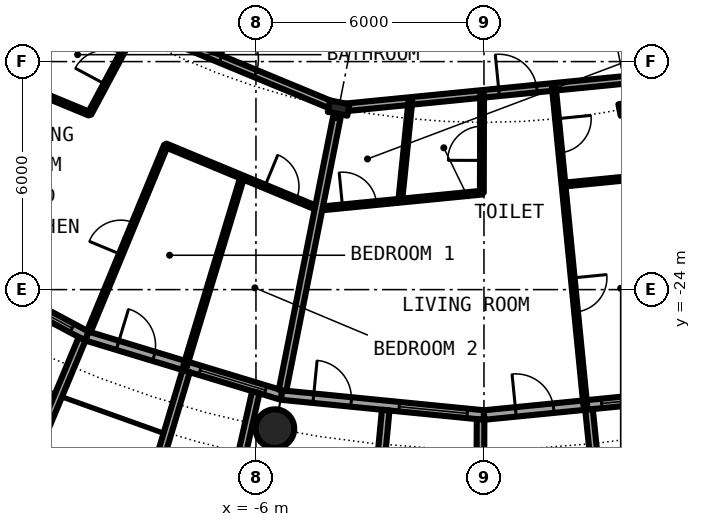
"""IFC4 building model, lengths in metres.
Left out: names, types, materials, properties, quantities, classifications, styles, units other than length and angle.
Written with IfcOpenShell. Run it as: python <this file> out.ifc"""

import sys

from ifc_helpers import new_model, si_unit, direction, frame, frame_2d, origin, origin_2d, place, context, subcontext, project, spatial, rectangle, hollow_circle, i_section, extrude, element, fill, save


model = new_model("IFC4")
c1 = context("Model", 3, precision=1e-05, world=origin(), true_north=direction((0.0, 1.0)))
c2 = subcontext(c1, "Body", "Model", "MODEL_VIEW")
j1 = project(units=[si_unit("LENGTHUNIT", "METRE"), si_unit("PLANEANGLEUNIT", "RADIAN")], contexts=[c1])
p1 = place(None, origin())
s1 = spatial("IfcSite", under=j1, at=p1, CompositionType="ELEMENT")
p2 = place(p1, origin())
s2 = spatial("IfcBuilding", under=s1, at=p2, CompositionType="ELEMENT")
p3 = place(p2, frame((0.0, 0.0, 63.6)))
s3 = spatial("IfcBuildingStorey", under=s2, at=p3, CompositionType="ELEMENT", Elevation=63.6)
p4 = place(p3, frame((-5.501, -27.658, 0.0), z_axis=(0.0, 0.0, 1.0), x_axis=(1.0, 0.0, 0.0)))
e1 = element("IfcColumn", 1, at=p4, inside=s3, PredefinedType="COLUMN", context=c2, shape_type="SweptSolid", body=[
    extrude(hollow_circle(Radius=0.508, WallThickness=0.04, at=origin_2d()), origin(), (0.0, 0.0, 1.0), 3.05),
])
for number, where, z_axis, x_axis in (
    (2, (-3.824, -19.223, 0.0), (0.0, 0.0, 1.0), (-0.195, -0.981, 0.0)),
    (3, (3.824, -19.223, 0.0), (0.0, 0.0, 1.0), (0.195, -0.981, 0.0)),
):
    element("IfcColumn", number, at=place(p3, frame(where, z_axis=z_axis, x_axis=x_axis)), inside=s3, PredefinedType="COLUMN", context=c2, shape_type="SweptSolid", body=[
        extrude(i_section(OverallWidth=0.306, OverallDepth=0.524, WebThickness=0.021, FlangeThickness=0.04, FilletRadius=0.027, at=origin_2d()), origin(), (0.0, 0.0, 1.0), 3.05),
    ])
p5 = place(p3, frame((-15.167, -22.699, 0.0), z_axis=(0.0, 0.0, 1.0), x_axis=(0.881915646801, -0.471407246368, 0.0)))
e4 = element("IfcWall", 4, at=p5, inside=s3, PredefinedType="SOLIDWALL", context=c2, shape_type="SweptSolid", body=[
    extrude(rectangle(XDim=5.352, YDim=0.25, at=frame_2d((2.676, 0.0))), origin(), (0.0, 0.0, 1.0), 2.7),
])
p6 = place(p5, frame((0.841, 0.0, 0.0)))
e5 = element("IfcOpeningElement", 5, at=p6, cuts=e4, PredefinedType="OPENING", context=c2, shape_type="SweptSolid", body=[
    extrude(rectangle(XDim=1.0, YDim=2.2, at=frame_2d((0.5, 1.1))), frame((0.0, 0.135, 0.0), z_axis=(0.0, -1.0, 0.0), x_axis=(1.0, 0.0, 0.0)), (0.0, 0.0, 1.0), 0.27),
])
p7 = place(p5, frame((3.111, 0.0, 0.3)))
e6 = element("IfcOpeningElement", 6, at=p7, cuts=e4, PredefinedType="OPENING", context=c2, shape_type="SweptSolid", body=[
    extrude(rectangle(XDim=1.8, YDim=2.1, at=frame_2d((0.9, 1.05))), frame((0.0, 0.135, 0.0), z_axis=(0.0, -1.0, 0.0), x_axis=(1.0, 0.0, 0.0)), (0.0, 0.0, 1.0), 0.27),
])
p8 = place(p3, frame((-10.575, -25.295, -0.03), z_axis=(0.0, 0.0, 1.0), x_axis=(-0.385697364644, -0.922625353492, 0.0)))
e7 = element("IfcWall", 7, at=p8, inside=s3, PredefinedType="SOLIDWALL", context=c2, shape_type="SweptSolid", body=[
    extrude(rectangle(XDim=2.883, YDim=0.2, at=frame_2d((1.442, 0.0))), origin(), (0.0, 0.0, 1.0), 2.73),
])
p9 = place(p3, frame((-10.447, -25.222, 0.0), z_axis=(0.0, 0.0, 1.0), x_axis=(0.956965678721, -0.290201119486, 0.0)))
e8 = element("IfcWall", 8, at=p9, inside=s3, PredefinedType="SOLIDWALL", context=c2, shape_type="SweptSolid", body=[
    extrude(rectangle(XDim=5.351, YDim=0.25, at=frame_2d((2.676, 0.0))), origin(), (0.0, 0.0, 1.0), 2.7),
])
p10 = place(p9, frame((0.841, 0.0, 0.0)))
e9 = element("IfcOpeningElement", 9, at=p10, cuts=e8, PredefinedType="OPENING", context=c2, shape_type="SweptSolid", body=[
    extrude(rectangle(XDim=1.0, YDim=2.2, at=frame_2d((0.5, 1.1))), frame((0.0, 0.135, 0.0), z_axis=(0.0, -1.0, 0.0), x_axis=(1.0, 0.0, 0.0)), (0.0, 0.0, 1.0), 0.27),
])
p11 = place(p9, frame((3.111, 0.0, 0.3)))
e10 = element("IfcOpeningElement", 10, at=p11, cuts=e8, PredefinedType="OPENING", context=c2, shape_type="SweptSolid", body=[
    extrude(rectangle(XDim=1.8, YDim=2.1, at=frame_2d((0.9, 1.05))), frame((0.0, 0.135, 0.0), z_axis=(0.0, -1.0, 0.0), x_axis=(1.0, 0.0, 0.0)), (0.0, 0.0, 1.0), 0.27),
])
p12 = place(p3, frame((-7.837, -26.144, -0.03), z_axis=(0.0, 0.0, 1.0), x_axis=(-0.287064767992, -0.957911174889, 0.0)))
e11 = element("IfcWall", 11, at=p12, inside=s3, PredefinedType="SOLIDWALL", context=c2, shape_type="SweptSolid", body=[
    extrude(rectangle(XDim=3.006, YDim=0.2, at=frame_2d((1.503, 0.0))), origin(), (0.0, 0.0, 1.0), 2.73),
])
p13 = place(p3, frame((-6.004, -26.7, -0.03), z_axis=(0.0, 0.0, 1.0), x_axis=(-0.219609259383, -0.975587911566, 0.0)))
e12 = element("IfcWall", 12, at=p13, inside=s3, PredefinedType="SOLIDWALL", context=c2, shape_type="SweptSolid", body=[
    extrude(rectangle(XDim=2.933, YDim=0.2, at=frame_2d((1.466, 0.0))), origin(), (0.0, 0.0, 1.0), 2.73),
])
p14 = place(p3, frame((-5.326, -26.775, 0.0), z_axis=(0.0, 0.0, 1.0), x_axis=(0.995173996315, -0.098126026407, 0.0)))
e13 = element("IfcWall", 13, at=p14, inside=s3, PredefinedType="SOLIDWALL", context=c2, shape_type="SweptSolid", body=[
    extrude(rectangle(XDim=5.352, YDim=0.25, at=frame_2d((2.676, 0.0))), origin(), (0.0, 0.0, 1.0), 2.7),
])
p15 = place(p14, frame((0.841, 0.0, 0.0)))
e14 = element("IfcOpeningElement", 14, at=p15, cuts=e13, PredefinedType="OPENING", context=c2, shape_type="SweptSolid", body=[
    extrude(rectangle(XDim=1.0, YDim=2.2, at=frame_2d((0.5, 1.1))), frame((0.0, 0.135, 0.0), z_axis=(0.0, -1.0, 0.0), x_axis=(1.0, 0.0, 0.0)), (0.0, 0.0, 1.0), 0.27),
])
p16 = place(p14, frame((3.111, 0.0, 0.3)))
e15 = element("IfcOpeningElement", 15, at=p16, cuts=e13, PredefinedType="OPENING", context=c2, shape_type="SweptSolid", body=[
    extrude(rectangle(XDim=1.8, YDim=2.1, at=frame_2d((0.9, 1.05))), frame((0.0, 0.135, 0.0), z_axis=(0.0, -1.0, 0.0), x_axis=(1.0, 0.0, 0.0)), (0.0, 0.0, 1.0), 0.27),
])
p17 = place(p3, frame((-2.586, -27.171, -0.03), z_axis=(0.0, 0.0, 1.0), x_axis=(-0.094548432284, -0.995520262954, 0.0)))
e16 = element("IfcWall", 16, at=p17, inside=s3, PredefinedType="SOLIDWALL", context=c2, shape_type="SweptSolid", body=[
    extrude(rectangle(XDim=3.006, YDim=0.2, at=frame_2d((1.503, 0.0))), origin(), (0.0, 0.0, 1.0), 2.73),
])
p18 = place(p3, frame((-0.09, -27.417, -0.03), z_axis=(0.0, 0.0, 1.0), x_axis=(-0.00347308367, -0.999993968827, 0.0)))
e17 = element("IfcWall", 17, at=p18, inside=s3, PredefinedType="SOLIDWALL", context=c2, shape_type="SweptSolid", body=[
    extrude(rectangle(XDim=2.882, YDim=0.2, at=frame_2d((1.441, 0.0))), origin(), (0.0, 0.0, 1.0), 2.73),
])
p19 = place(p3, frame((0.0, -27.3, 0.0), z_axis=(0.0, 0.0, 1.0), x_axis=(0.995173996315, 0.098126026407, 0.0)))
e18 = element("IfcWall", 18, at=p19, inside=s3, PredefinedType="SOLIDWALL", context=c2, shape_type="SweptSolid", body=[
    extrude(rectangle(XDim=5.352, YDim=0.25, at=frame_2d((2.676, 0.0))), origin(), (0.0, 0.0, 1.0), 2.7),
])
p20 = place(p19, frame((0.841, 0.0, 0.0)))
e19 = element("IfcOpeningElement", 19, at=p20, cuts=e18, PredefinedType="OPENING", context=c2, shape_type="SweptSolid", body=[
    extrude(rectangle(XDim=1.0, YDim=2.2, at=frame_2d((0.5, 1.1))), frame((0.0, 0.135, 0.0), z_axis=(0.0, -1.0, 0.0), x_axis=(1.0, 0.0, 0.0)), (0.0, 0.0, 1.0), 0.27),
])
p21 = place(p19, frame((3.111, 0.0, 0.3)))
e20 = element("IfcOpeningElement", 20, at=p21, cuts=e18, PredefinedType="OPENING", context=c2, shape_type="SweptSolid", body=[
    extrude(rectangle(XDim=1.8, YDim=2.1, at=frame_2d((0.9, 1.05))), frame((0.0, 0.135, 0.0), z_axis=(0.0, -1.0, 0.0), x_axis=(1.0, 0.0, 0.0)), (0.0, 0.0, 1.0), 0.27),
])
p22 = place(p3, frame((2.764, -27.153, -0.03), z_axis=(0.0, 0.0, 1.0), x_axis=(0.101505487237, -0.994834979311, 0.0)))
e21 = element("IfcWall", 21, at=p22, inside=s3, PredefinedType="SOLIDWALL", context=c2, shape_type="SweptSolid", body=[
    extrude(rectangle(XDim=3.007, YDim=0.2, at=frame_2d((1.503, 0.0))), origin(), (0.0, 0.0, 1.0), 2.73),
])
p23 = place(p3, frame((-12.392, -18.541, 0.0), z_axis=(0.0, 0.0, 1.0), x_axis=(0.923901895183, -0.382629439638, 0.0)))
e22 = element("IfcWall", 22, at=p23, inside=s3, PredefinedType="PARTITIONING", context=c2, shape_type="SweptSolid", body=[
    extrude(rectangle(XDim=2.175, YDim=0.1, at=frame_2d((1.087, 0.0))), origin(), (0.0, 0.0, 1.0), 2.7),
])
p24 = place(p3, frame((-8.376, -20.204, 0.0), z_axis=(0.0, 0.0, 1.0), x_axis=(0.92378218199, -0.382918372814, 0.0)))
e23 = element("IfcWall", 23, at=p24, inside=s3, PredefinedType="PARTITIONING", context=c2, shape_type="SweptSolid", body=[
    extrude(rectangle(XDim=4.364, YDim=0.1, at=frame_2d((2.182, 0.0))), origin(), (0.0, 0.0, 1.0), 2.7),
])
p25 = place(p24, frame((2.823, 0.0, 0.0)))
e24 = element("IfcOpeningElement", 24, at=p25, cuts=e23, PredefinedType="OPENING", context=c2, shape_type="SweptSolid", body=[
    extrude(rectangle(XDim=0.9, YDim=2.3, at=frame_2d((0.45, 1.15))), frame((0.0, 0.06, 0.0), z_axis=(0.0, -1.0, 0.0), x_axis=(1.0, 0.0, 0.0)), (0.0, 0.0, 1.0), 0.12),
])
p26 = place(p3, frame((-4.36, -21.872, 0.0), z_axis=(0.0, 0.0, 1.0), x_axis=(0.995203449084, 0.097826862012, 0.0)))
e25 = element("IfcWall", 25, at=p26, inside=s3, PredefinedType="PARTITIONING", context=c2, shape_type="SweptSolid", body=[
    extrude(rectangle(XDim=4.325, YDim=0.1, at=frame_2d((2.163, 0.0))), origin(), (0.0, 0.0, 1.0), 2.7),
])
p27 = place(p26, frame((0.64, 0.0, 0.0)))
e26 = element("IfcOpeningElement", 26, at=p27, cuts=e25, PredefinedType="OPENING", context=c2, shape_type="SweptSolid", body=[
    extrude(rectangle(XDim=0.9, YDim=2.3, at=frame_2d((0.45, 1.15))), frame((0.0, 0.06, 0.0), z_axis=(0.0, -1.0, 0.0), x_axis=(1.0, 0.0, 0.0)), (0.0, 0.0, 1.0), 0.12),
])
p28 = place(p3, frame((2.089, -21.238, 0.0), z_axis=(0.0, 0.0, 1.0), x_axis=(0.995211787668, 0.097741995509, 0.0)))
e27 = element("IfcWall", 27, at=p28, inside=s3, PredefinedType="PARTITIONING", context=c2, shape_type="SweptSolid", body=[
    extrude(rectangle(XDim=6.477, YDim=0.1, at=frame_2d((3.238, 0.0))), origin(), (0.0, 0.0, 1.0), 2.7),
])
p29 = place(p3, frame((-10.745, -16.356, 0.0), z_axis=(0.0, 0.0, 1.0), x_axis=(0.923881347896, -0.382679049609, 0.0)))
e28 = element("IfcWall", 28, at=p29, inside=s3, PredefinedType="PARTITIONING", context=c2, shape_type="SweptSolid", body=[
    extrude(rectangle(XDim=7.335, YDim=0.2, at=frame_2d((3.668, 0.0))), origin(), (0.0, 0.0, 1.0), 2.38),
])
p30 = place(p29, frame((4.124, 0.0, 0.0)))
e29 = element("IfcOpeningElement", 29, at=p30, cuts=e28, PredefinedType="OPENING", context=c2, shape_type="SweptSolid", body=[
    extrude(rectangle(XDim=1.0, YDim=2.3, at=frame_2d((0.5, 1.15))), frame((0.0, 0.11, 0.0), z_axis=(0.0, -1.0, 0.0), x_axis=(1.0, 0.0, 0.0)), (0.0, 0.0, 1.0), 0.22),
])
p31 = place(p3, frame((-3.665, -19.207, 0.0), z_axis=(0.0, 0.0, 1.0), x_axis=(0.995190249661, 0.097961048277, 0.0)))
e30 = element("IfcWall", 30, at=p31, inside=s3, PredefinedType="PARTITIONING", context=c2, shape_type="SweptSolid", body=[
    extrude(rectangle(XDim=11.22, YDim=0.2, at=frame_2d((5.61, 0.0))), origin(), (0.0, 0.0, 1.0), 2.38),
])
p32 = place(p31, frame((4.08, 0.0, 0.0)))
e31 = element("IfcOpeningElement", 31, at=p32, cuts=e30, PredefinedType="OPENING", context=c2, shape_type="SweptSolid", body=[
    extrude(rectangle(XDim=1.0, YDim=2.3, at=frame_2d((0.5, 1.15))), frame((0.0, 0.11, 0.0), z_axis=(0.0, -1.0, 0.0), x_axis=(1.0, 0.0, 0.0)), (0.0, 0.0, 1.0), 0.22),
])
p33 = place(p3, frame((1.838, -18.666, 0.0), z_axis=(0.0, 0.0, 1.0), x_axis=(0.098366640075, -0.995150241984, 0.0)))
e32 = element("IfcWall", 32, at=p33, inside=s3, PredefinedType="PARTITIONING", context=c2, shape_type="SweptSolid", body=[
    extrude(rectangle(XDim=8.419, YDim=0.1, at=frame_2d((4.209, 0.0))), origin(), (0.0, 0.0, 1.0), 2.7),
])
p34 = place(p33, frame((0.842, 0.0, 0.0)))
e33 = element("IfcOpeningElement", 33, at=p34, cuts=e32, PredefinedType="OPENING", context=c2, shape_type="SweptSolid", body=[
    extrude(rectangle(XDim=0.9, YDim=2.3, at=frame_2d((0.45, 1.15))), frame((0.0, 0.06, 0.0), z_axis=(0.0, -1.0, 0.0), x_axis=(1.0, 0.0, 0.0)), (0.0, 0.0, 1.0), 0.12),
])
p35 = place(p33, frame((5.051, 0.0, 0.0)))
e34 = element("IfcOpeningElement", 34, at=p35, cuts=e32, PredefinedType="OPENING", context=c2, shape_type="SweptSolid", body=[
    extrude(rectangle(XDim=0.9, YDim=2.3, at=frame_2d((0.45, 1.15))), frame((0.0, 0.06, 0.0), z_axis=(0.0, -1.0, 0.0), x_axis=(1.0, 0.0, 0.0)), (0.0, 0.0, 1.0), 0.12),
])
p36 = place(p3, frame((-15.098, -22.595, 0.0), z_axis=(0.0, 0.0, 1.0), x_axis=(0.555701298605, 0.831382022135, 0.0)))
e35 = element("IfcWall", 35, at=p36, inside=s3, PredefinedType="PARTITIONING", context=c2, shape_type="SweptSolid", body=[
    extrude(rectangle(XDim=7.313, YDim=0.2, at=frame_2d((3.657, 0.0))), origin(), (0.0, 0.0, 1.0), 2.7),
])
p37 = place(p3, frame((-10.399, -25.106, 0.0), z_axis=(0.0, 0.0, 1.0), x_axis=(0.382620183578, 0.92390572848, 0.0)))
e36 = element("IfcWall", 36, at=p37, inside=s3, PredefinedType="PARTITIONING", context=c2, shape_type="SweptSolid", body=[
    extrude(rectangle(XDim=5.302, YDim=0.1, at=frame_2d((2.651, 0.0))), origin(), (0.0, 0.0, 1.0), 2.7),
])
p38 = place(p37, frame((2.201, 0.0, 0.0)))
e37 = element("IfcOpeningElement", 37, at=p38, cuts=e36, PredefinedType="OPENING", context=c2, shape_type="SweptSolid", body=[
    extrude(rectangle(XDim=0.9, YDim=2.3, at=frame_2d((0.45, 1.15))), frame((0.0, 0.06, 0.0), z_axis=(0.0, -1.0, 0.0), x_axis=(1.0, 0.0, 0.0)), (0.0, 0.0, 1.0), 0.12),
])
p39 = place(p3, frame((-10.38, -19.374, 0.0), z_axis=(0.0, 0.0, 1.0), x_axis=(0.472244323015, 0.881467696164, 0.0)))
e38 = element("IfcWall", 38, at=p39, inside=s3, PredefinedType="PARTITIONING", context=c2, shape_type="SweptSolid", body=[
    extrude(rectangle(XDim=2.661, YDim=0.1, at=frame_2d((1.331, 0.0))), origin(), (0.0, 0.0, 1.0), 2.7),
])
p40 = place(p39, frame((0.881, 0.0, 0.0)))
e39 = element("IfcOpeningElement", 39, at=p40, cuts=e38, PredefinedType="OPENING", context=c2, shape_type="SweptSolid", body=[
    extrude(rectangle(XDim=0.9, YDim=2.3, at=frame_2d((0.45, 1.15))), frame((0.0, 0.06, 0.0), z_axis=(0.0, -1.0, 0.0), x_axis=(1.0, 0.0, 0.0)), (0.0, 0.0, 1.0), 0.12),
])
p41 = place(p3, frame((-7.864, -26.012, 0.0), z_axis=(0.0, 0.0, 1.0), x_axis=(0.289472609969, 0.957186297477, 0.0)))
e40 = element("IfcWall", 40, at=p41, inside=s3, PredefinedType="PARTITIONING", context=c2, shape_type="SweptSolid", body=[
    extrude(rectangle(XDim=5.195, YDim=0.1, at=frame_2d((2.598, 0.0))), origin(), (0.0, 0.0, 1.0), 2.7),
])
p42 = place(p3, frame((-5.302, -26.653, 0.0), z_axis=(0.0, 0.0, 1.0), x_axis=(0.195114589291, 0.98078045303, 0.0)))
e41 = element("IfcWall", 41, at=p42, inside=s3, PredefinedType="PARTITIONING", context=c2, shape_type="SweptSolid", body=[
    extrude(rectangle(XDim=7.314, YDim=0.2, at=frame_2d((3.657, 0.0))), origin(), (0.0, 0.0, 1.0), 2.7),
])
p43 = place(p3, frame((-2.203, -21.66, 0.0), z_axis=(0.0, 0.0, 1.0), x_axis=(0.101218154182, 0.994864254692, 0.0)))
e42 = element("IfcWall", 42, at=p43, inside=s3, PredefinedType="PARTITIONING", context=c2, shape_type="SweptSolid", body=[
    extrude(rectangle(XDim=2.636, YDim=0.1, at=frame_2d((1.318, 0.0))), origin(), (0.0, 0.0, 1.0), 2.7),
])
p44 = place(p3, frame((-0.056, -21.449, 0.0), z_axis=(0.0, 0.0, 1.0), x_axis=(0.002632312023, 0.999996535461, 0.0)))
e43 = element("IfcWall", 43, at=p44, inside=s3, PredefinedType="PARTITIONING", context=c2, shape_type="SweptSolid", body=[
    extrude(rectangle(XDim=2.597, YDim=0.1, at=frame_2d((1.298, 0.0))), origin(), (0.0, 0.0, 1.0), 2.7),
])
p45 = place(p44, frame((0.849, 0.0, 0.0)))
e44 = element("IfcOpeningElement", 44, at=p45, cuts=e43, PredefinedType="OPENING", context=c2, shape_type="SweptSolid", body=[
    extrude(rectangle(XDim=0.9, YDim=2.3, at=frame_2d((0.45, 1.15))), frame((0.0, 0.06, 0.0), z_axis=(0.0, -1.0, 0.0), x_axis=(1.0, 0.0, 0.0)), (0.0, 0.0, 1.0), 0.12),
])
p46 = place(p7, origin())
e45 = element("IfcWindow", 45, at=p46, inside=s3, PartitioningType="SINGLE_PANEL", PredefinedType="WINDOW", context=c2, shape_type="SweptSolid", body=[
    extrude(rectangle(XDim=1.8, YDim=2.1, at=frame_2d((0.9, 1.05))), frame((0.0, 0.03, 0.0), z_axis=(0.0, -1.0, 0.0), x_axis=(1.0, 0.0, 0.0)), (0.0, 0.0, 1.0), 0.06),
])
fill(e6, e45)
p47 = place(p10, origin())
e46 = element("IfcDoor", 46, at=p47, inside=s3, OperationType="SINGLE_SWING_LEFT", PredefinedType="DOOR", context=c2, shape_type="SweptSolid", body=[
    extrude(rectangle(XDim=1.0, YDim=2.2, at=frame_2d((0.5, 1.1))), frame((0.0, 0.025, 0.0), z_axis=(0.0, -1.0, 0.0), x_axis=(1.0, 0.0, 0.0)), (0.0, 0.0, 1.0), 0.05),
])
fill(e9, e46)
p48 = place(p11, origin())
e47 = element("IfcWindow", 47, at=p48, inside=s3, PartitioningType="SINGLE_PANEL", PredefinedType="WINDOW", context=c2, shape_type="SweptSolid", body=[
    extrude(rectangle(XDim=1.8, YDim=2.1, at=frame_2d((0.9, 1.05))), frame((0.0, 0.03, 0.0), z_axis=(0.0, -1.0, 0.0), x_axis=(1.0, 0.0, 0.0)), (0.0, 0.0, 1.0), 0.06),
])
fill(e10, e47)
p49 = place(p15, origin())
e48 = element("IfcDoor", 48, at=p49, inside=s3, OperationType="SINGLE_SWING_LEFT", PredefinedType="DOOR", context=c2, shape_type="SweptSolid", body=[
    extrude(rectangle(XDim=1.0, YDim=2.2, at=frame_2d((0.5, 1.1))), frame((0.0, 0.025, 0.0), z_axis=(0.0, -1.0, 0.0), x_axis=(1.0, 0.0, 0.0)), (0.0, 0.0, 1.0), 0.05),
])
fill(e14, e48)
p50 = place(p16, origin())
e49 = element("IfcWindow", 49, at=p50, inside=s3, PartitioningType="SINGLE_PANEL", PredefinedType="WINDOW", context=c2, shape_type="SweptSolid", body=[
    extrude(rectangle(XDim=1.8, YDim=2.1, at=frame_2d((0.9, 1.05))), frame((0.0, 0.03, 0.0), z_axis=(0.0, -1.0, 0.0), x_axis=(1.0, 0.0, 0.0)), (0.0, 0.0, 1.0), 0.06),
])
fill(e15, e49)
p51 = place(p20, origin())
e50 = element("IfcDoor", 50, at=p51, inside=s3, OperationType="SINGLE_SWING_LEFT", PredefinedType="DOOR", context=c2, shape_type="SweptSolid", body=[
    extrude(rectangle(XDim=1.0, YDim=2.2, at=frame_2d((0.5, 1.1))), frame((0.0, 0.025, 0.0), z_axis=(0.0, -1.0, 0.0), x_axis=(1.0, 0.0, 0.0)), (0.0, 0.0, 1.0), 0.05),
])
fill(e19, e50)
p52 = place(p21, origin())
e51 = element("IfcWindow", 51, at=p52, inside=s3, PartitioningType="SINGLE_PANEL", PredefinedType="WINDOW", context=c2, shape_type="SweptSolid", body=[
    extrude(rectangle(XDim=1.8, YDim=2.1, at=frame_2d((0.9, 1.05))), frame((0.0, 0.03, 0.0), z_axis=(0.0, -1.0, 0.0), x_axis=(1.0, 0.0, 0.0)), (0.0, 0.0, 1.0), 0.06),
])
fill(e20, e51)
p53 = place(p30, origin())
e52 = element("IfcDoor", 52, at=p53, inside=s3, OperationType="SINGLE_SWING_RIGHT", PredefinedType="DOOR", context=c2, shape_type="SweptSolid", body=[
    extrude(rectangle(XDim=1.0, YDim=2.3, at=frame_2d((0.5, 1.15))), frame((0.0, 0.025, 0.0), z_axis=(0.0, -1.0, 0.0), x_axis=(1.0, 0.0, 0.0)), (0.0, 0.0, 1.0), 0.05),
])
fill(e29, e52)
p54 = place(p40, origin())
e53 = element("IfcDoor", 53, at=p54, inside=s3, OperationType="SINGLE_SWING_RIGHT", PredefinedType="DOOR", context=c2, shape_type="SweptSolid", body=[
    extrude(rectangle(XDim=0.9, YDim=2.3, at=frame_2d((0.45, 1.15))), frame((0.0, 0.025, 0.0), z_axis=(0.0, -1.0, 0.0), x_axis=(1.0, 0.0, 0.0)), (0.0, 0.0, 1.0), 0.05),
])
fill(e39, e53)
p55 = place(p38, origin())
e54 = element("IfcDoor", 54, at=p55, inside=s3, OperationType="SINGLE_SWING_LEFT", PredefinedType="DOOR", context=c2, shape_type="SweptSolid", body=[
    extrude(rectangle(XDim=0.9, YDim=2.3, at=frame_2d((0.45, 1.15))), frame((0.0, 0.025, 0.0), z_axis=(0.0, -1.0, 0.0), x_axis=(1.0, 0.0, 0.0)), (0.0, 0.0, 1.0), 0.05),
])
fill(e37, e54)
p56 = place(p25, origin())
e55 = element("IfcDoor", 55, at=p56, inside=s3, OperationType="SINGLE_SWING_RIGHT", PredefinedType="DOOR", context=c2, shape_type="SweptSolid", body=[
    extrude(rectangle(XDim=0.9, YDim=2.3, at=frame_2d((0.45, 1.15))), frame((0.0, 0.025, 0.0), z_axis=(0.0, -1.0, 0.0), x_axis=(1.0, 0.0, 0.0)), (0.0, 0.0, 1.0), 0.05),
])
fill(e24, e55)
p57 = place(p32, origin())
e56 = element("IfcDoor", 56, at=p57, inside=s3, OperationType="SINGLE_SWING_LEFT", PredefinedType="DOOR", context=c2, shape_type="SweptSolid", body=[
    extrude(rectangle(XDim=1.0, YDim=2.3, at=frame_2d((0.5, 1.15))), frame((0.0, 0.025, 0.0), z_axis=(0.0, -1.0, 0.0), x_axis=(1.0, 0.0, 0.0)), (0.0, 0.0, 1.0), 0.05),
])
fill(e31, e56)
p58 = place(p27, origin())
e57 = element("IfcDoor", 57, at=p58, inside=s3, OperationType="SINGLE_SWING_LEFT", PredefinedType="DOOR", context=c2, shape_type="SweptSolid", body=[
    extrude(rectangle(XDim=0.9, YDim=2.3, at=frame_2d((0.45, 1.15))), frame((0.0, 0.025, 0.0), z_axis=(0.0, -1.0, 0.0), x_axis=(1.0, 0.0, 0.0)), (0.0, 0.0, 1.0), 0.05),
])
fill(e26, e57)
p59 = place(p45, origin())
e58 = element("IfcDoor", 58, at=p59, inside=s3, OperationType="SINGLE_SWING_RIGHT", PredefinedType="DOOR", context=c2, shape_type="SweptSolid", body=[
    extrude(rectangle(XDim=0.9, YDim=2.3, at=frame_2d((0.45, 1.15))), frame((0.0, 0.025, 0.0), z_axis=(0.0, -1.0, 0.0), x_axis=(1.0, 0.0, 0.0)), (0.0, 0.0, 1.0), 0.05),
])
fill(e44, e58)
p60 = place(p34, origin())
e59 = element("IfcDoor", 59, at=p60, inside=s3, OperationType="SINGLE_SWING_LEFT", PredefinedType="DOOR", context=c2, shape_type="SweptSolid", body=[
    extrude(rectangle(XDim=0.9, YDim=2.3, at=frame_2d((0.45, 1.15))), frame((0.0, 0.025, 0.0), z_axis=(0.0, -1.0, 0.0), x_axis=(1.0, 0.0, 0.0)), (0.0, 0.0, 1.0), 0.05),
])
fill(e33, e59)
p61 = place(p35, origin())
e60 = element("IfcDoor", 60, at=p61, inside=s3, OperationType="SINGLE_SWING_RIGHT", PredefinedType="DOOR", context=c2, shape_type="SweptSolid", body=[
    extrude(rectangle(XDim=0.9, YDim=2.3, at=frame_2d((0.45, 1.15))), frame((0.0, 0.025, 0.0), z_axis=(0.0, -1.0, 0.0), x_axis=(1.0, 0.0, 0.0)), (0.0, 0.0, 1.0), 0.05),
])
fill(e34, e60)
save(model, sys.argv[1])
